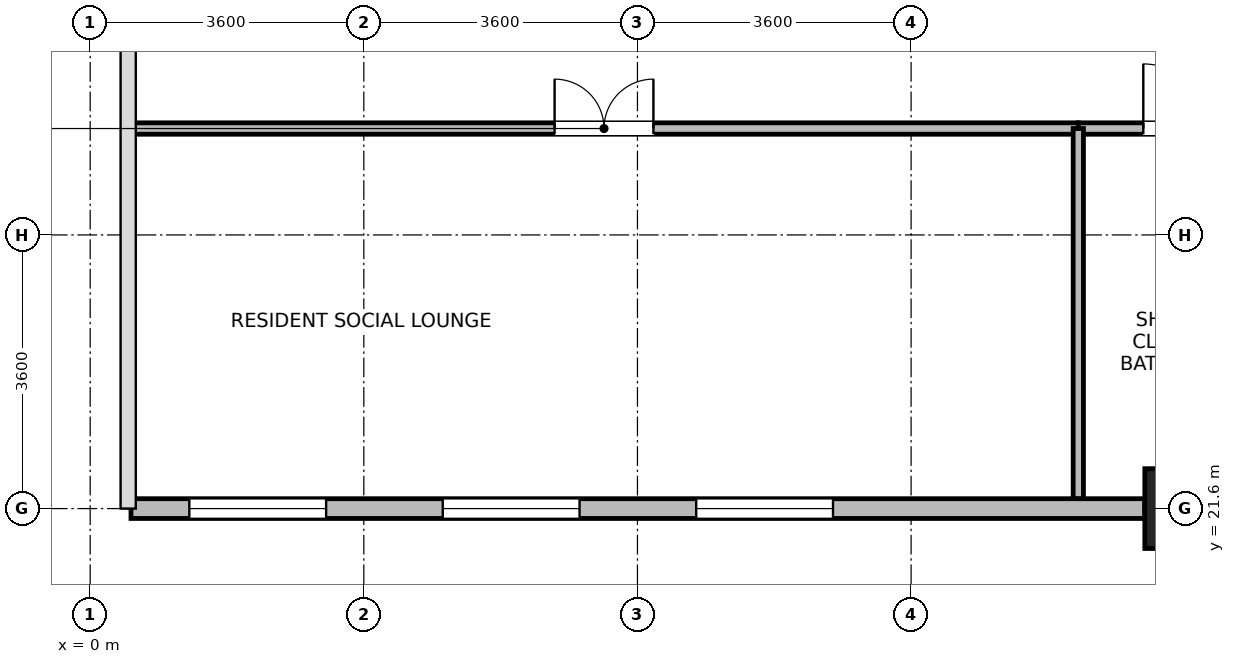
"""IFC4 building model, lengths in metres.
Left out: names, types, materials, properties, quantities, classifications, styles, units other than length and angle.
Written with IfcOpenShell. Run it as: python <this file> out.ifc"""

import sys

from ifc_helpers import new_model, si_unit, direction, frame, frame_2d, origin, origin_2d, place, context, subcontext, project, spatial, rectangle, extrude, source, transform, mapped, element, fill, save


model = new_model("IFC4")
c1 = context("Model", 3, precision=1e-05, world=origin(), true_north=direction((0.0, 1.0)))
c2 = subcontext(c1, "Body", "Model", "MODEL_VIEW")
j1 = project(units=[si_unit("LENGTHUNIT", "METRE"), si_unit("PLANEANGLEUNIT", "RADIAN")], contexts=[c1])
p1 = place(None, origin())
s1 = spatial("IfcSite", under=j1, at=p1, CompositionType="ELEMENT")
p2 = place(p1, origin())
s2 = spatial("IfcBuilding", under=s1, at=p2, CompositionType="ELEMENT")
p3 = place(p2, frame((0.0, 0.0, 140.2)))
s3 = spatial("IfcBuildingStorey", under=s2, at=p3, CompositionType="ELEMENT", Elevation=140.2)
m1 = source(origin(), c2, "Body", "SweptSolid", [
    extrude(rectangle(XDim=1.05, YDim=1.05, at=origin_2d()), origin(), (0.0, 0.0, 1.0), 3.7),
])
p4 = place(p3, frame((14.4, 21.6, 0.0), z_axis=(0.0, 0.0, 1.0), x_axis=(1.0, 0.0, 0.0)))
e1 = element("IfcColumn", 1, at=p4, inside=s3, PredefinedType="COLUMN", context=c2, shape_type="MappedRepresentation", body=[
    mapped(m1, transform((0.0, 0.0, 0.0), x_axis=(1.0, 0.0, 0.0), y_axis=(0.0, 1.0, 0.0), z_axis=(0.0, 0.0, 1.0), scale=1.0)),
])
p5 = place(p3, frame((13.874, 21.6, 0.0), z_axis=(0.0, 0.0, 1.0), x_axis=(-1.0, 0.0, 0.0)))
e2 = element("IfcWall", 2, at=p5, inside=s3, PredefinedType="STANDARD", context=c2, shape_type="SweptSolid", body=[
    extrude(rectangle(XDim=13.337, YDim=0.26, at=frame_2d((6.668, 0.0))), origin(), (0.0, 0.0, 1.0), 3.44),
])
p6 = place(p5, frame((4.101, 0.0, 0.85)))
e3 = element("IfcOpeningElement", 3, at=p6, cuts=e2, PredefinedType="OPENING", context=c2, shape_type="SweptSolid", body=[
    extrude(rectangle(XDim=1.8, YDim=1.85, at=frame_2d((0.9, 0.925))), frame((0.0, 0.14, 0.0), z_axis=(0.0, -1.0, 0.0), x_axis=(1.0, 0.0, 0.0)), (0.0, 0.0, 1.0), 0.28),
])
p7 = place(p5, frame((7.436, 0.0, 0.85)))
e4 = element("IfcOpeningElement", 4, at=p7, cuts=e2, PredefinedType="OPENING", context=c2, shape_type="SweptSolid", body=[
    extrude(rectangle(XDim=1.8, YDim=1.85, at=frame_2d((0.9, 0.925))), frame((0.0, 0.14, 0.0), z_axis=(0.0, -1.0, 0.0), x_axis=(1.0, 0.0, 0.0)), (0.0, 0.0, 1.0), 0.28),
])
p8 = place(p5, frame((10.77, 0.0, 0.85)))
e5 = element("IfcOpeningElement", 5, at=p8, cuts=e2, PredefinedType="OPENING", context=c2, shape_type="SweptSolid", body=[
    extrude(rectangle(XDim=1.8, YDim=1.85, at=frame_2d((0.9, 0.925))), frame((0.0, 0.14, 0.0), z_axis=(0.0, -1.0, 0.0), x_axis=(1.0, 0.0, 0.0)), (0.0, 0.0, 1.0), 0.28),
])
p9 = place(p3, frame((0.52, 26.6, 0.0), z_axis=(0.0, 0.0, 1.0), x_axis=(1.0, 0.0, 0.0)))
e6 = element("IfcWall", 6, at=p9, inside=s3, PredefinedType="PARTITIONING", context=c2, shape_type="SweptSolid", body=[
    extrude(rectangle(XDim=12.48, YDim=0.15, at=frame_2d((6.24, 0.0))), origin(), (0.0, 0.0, 1.0), 3.44),
])
p10 = place(p9, frame((5.59, 0.0, 0.0)))
e7 = element("IfcOpeningElement", 7, at=p10, cuts=e6, PredefinedType="OPENING", context=c2, shape_type="SweptSolid", body=[
    extrude(rectangle(XDim=1.3, YDim=2.12, at=frame_2d((0.65, 1.06))), frame((0.0, 0.085, 0.0), z_axis=(0.0, -1.0, 0.0), x_axis=(1.0, 0.0, 0.0)), (0.0, 0.0, 1.0), 0.17),
])
p11 = place(p3, frame((13.0, 26.6, 0.0), z_axis=(0.0, 0.0, 1.0), x_axis=(1.0, 0.0, 0.0)))
e8 = element("IfcWall", 8, at=p11, inside=s3, PredefinedType="PARTITIONING", context=c2, shape_type="SweptSolid", body=[
    extrude(rectangle(XDim=2.56, YDim=0.15, at=frame_2d((1.28, 0.0))), origin(), (0.0, 0.0, 1.0), 3.44),
])
p12 = place(p11, frame((0.855, 0.0, 0.0)))
e9 = element("IfcOpeningElement", 9, at=p12, cuts=e8, PredefinedType="OPENING", context=c2, shape_type="SweptSolid", body=[
    extrude(rectangle(XDim=0.85, YDim=2.04, at=frame_2d((0.425, 1.02))), frame((0.0, 0.085, 0.0), z_axis=(0.0, -1.0, 0.0), x_axis=(1.0, 0.0, 0.0)), (0.0, 0.0, 1.0), 0.17),
])
p13 = place(p3, frame((13.0, 21.732, 0.0), z_axis=(0.0, 0.0, 1.0), x_axis=(0.0, 1.0, 0.0)))
e10 = element("IfcWall", 10, at=p13, inside=s3, PredefinedType="PARTITIONING", context=c2, shape_type="SweptSolid", body=[
    extrude(rectangle(XDim=4.868, YDim=0.135, at=frame_2d((2.434, 0.0))), origin(), (0.0, 0.0, 1.0), 3.44),
])
p14 = place(p6, origin())
e11 = element("IfcWindow", 11, at=p14, inside=s3, PartitioningType="SINGLE_PANEL", PredefinedType="WINDOW", context=c2, shape_type="SweptSolid", body=[
    extrude(rectangle(XDim=1.8, YDim=1.85, at=frame_2d((0.9, 0.925))), frame((0.0, 0.03, 0.0), z_axis=(0.0, -1.0, 0.0), x_axis=(1.0, 0.0, 0.0)), (0.0, 0.0, 1.0), 0.06),
])
fill(e3, e11)
p15 = place(p7, origin())
e12 = element("IfcWindow", 12, at=p15, inside=s3, PartitioningType="SINGLE_PANEL", PredefinedType="WINDOW", context=c2, shape_type="SweptSolid", body=[
    extrude(rectangle(XDim=1.8, YDim=1.85, at=frame_2d((0.9, 0.925))), frame((0.0, 0.03, 0.0), z_axis=(0.0, -1.0, 0.0), x_axis=(1.0, 0.0, 0.0)), (0.0, 0.0, 1.0), 0.06),
])
fill(e4, e12)
p16 = place(p8, origin())
e13 = element("IfcWindow", 13, at=p16, inside=s3, PartitioningType="SINGLE_PANEL", PredefinedType="WINDOW", context=c2, shape_type="SweptSolid", body=[
    extrude(rectangle(XDim=1.8, YDim=1.85, at=frame_2d((0.9, 0.925))), frame((0.0, 0.03, 0.0), z_axis=(0.0, -1.0, 0.0), x_axis=(1.0, 0.0, 0.0)), (0.0, 0.0, 1.0), 0.06),
])
fill(e5, e13)
p17 = place(p10, origin())
e14 = element("IfcDoor", 14, at=p17, inside=s3, OperationType="DOUBLE_DOOR_SINGLE_SWING", PredefinedType="DOOR", context=c2, shape_type="SweptSolid", body=[
    extrude(rectangle(XDim=1.3, YDim=2.12, at=frame_2d((0.65, 1.06))), frame((0.0, 0.025, 0.0), z_axis=(0.0, -1.0, 0.0), x_axis=(1.0, 0.0, 0.0)), (0.0, 0.0, 1.0), 0.05),
])
fill(e7, e14)
p18 = place(p12, origin())
e15 = element("IfcDoor", 15, at=p18, inside=s3, OperationType="SINGLE_SWING_LEFT", PredefinedType="DOOR", context=c2, shape_type="SweptSolid", body=[
    extrude(rectangle(XDim=0.85, YDim=2.04, at=frame_2d((0.425, 1.02))), frame((0.0, 0.025, 0.0), z_axis=(0.0, -1.0, 0.0), x_axis=(1.0, 0.0, 0.0)), (0.0, 0.0, 1.0), 0.05),
])
fill(e9, e15)
save(model, sys.argv[1])
